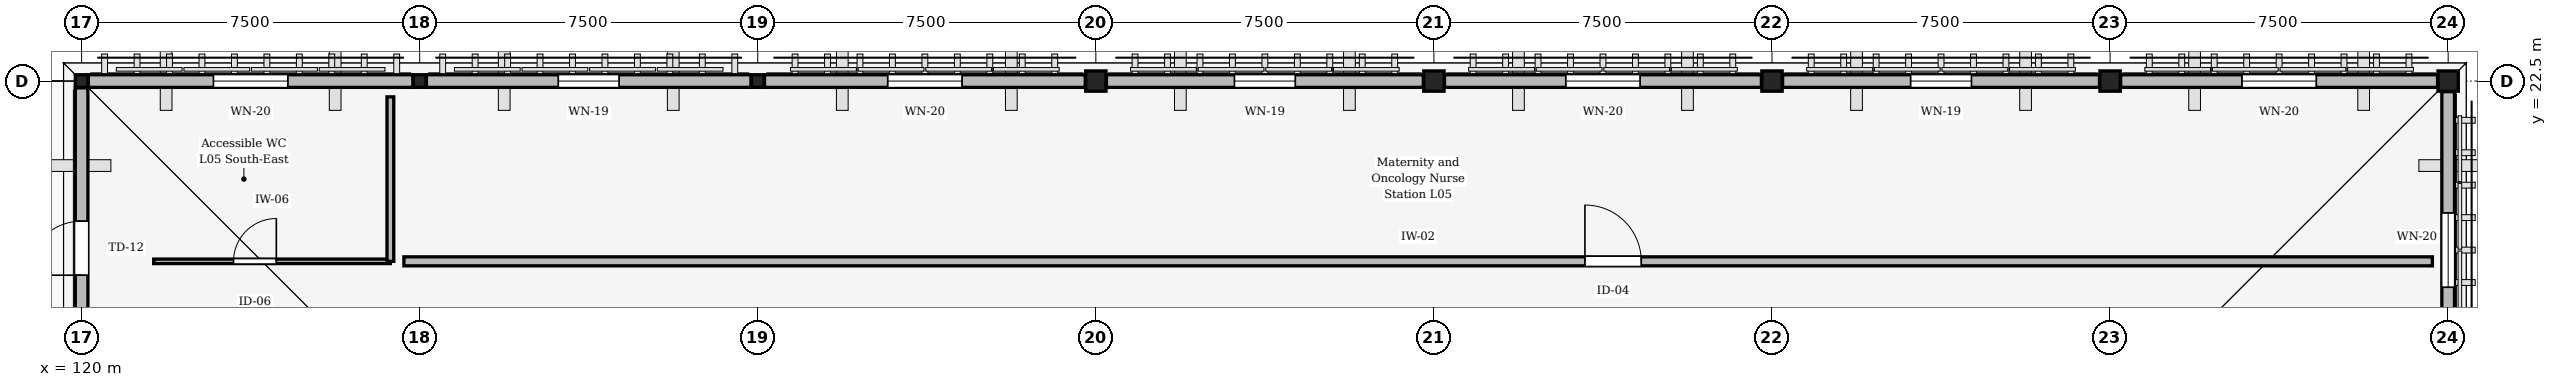
"""IFC4 building model, lengths in metres.
Left out: names, types, materials, properties, quantities, classifications, styles, units other than length and angle.
Written with IfcOpenShell. Run it as: python <this file> out.ifc"""

import sys

from ifc_helpers import new_model, si_unit, direction, frame, frame_2d, origin, origin_2d, place, context, subcontext, project, spatial, rectangle, extrude, element, fill, save


model = new_model("IFC4")
c1 = context("Model", 3, precision=1e-05, world=origin(), true_north=direction((0.0, 1.0)))
c2 = subcontext(c1, "Body", "Model", "MODEL_VIEW")
j1 = project(units=[si_unit("LENGTHUNIT", "METRE"), si_unit("PLANEANGLEUNIT", "RADIAN")], contexts=[c1])
p1 = place(None, origin())
s1 = spatial("IfcSite", under=j1, at=p1, CompositionType="ELEMENT")
p2 = place(p1, origin())
s2 = spatial("IfcBuilding", under=s1, at=p2, CompositionType="ELEMENT")
p3 = place(p2, frame((0.0, 0.0, 21.9)))
s3 = spatial("IfcBuildingStorey", under=s2, at=p3, CompositionType="ELEMENT", Elevation=21.9)
for number, where, z_axis, x_axis in (
    (1, (120.0, 22.5, 0.0), (0.0, 0.0, 1.0), (1.0, 0.0, 0.0)),
    (2, (127.5, 22.5, 0.0), (0.0, 0.0, 1.0), (1.0, 0.0, 0.0)),
    (3, (135.0, 22.5, 0.0), (0.0, 0.0, 1.0), (1.0, 0.0, 0.0)),
):
    element("IfcColumn", number, at=place(p3, frame(where, z_axis=z_axis, x_axis=x_axis)), inside=s3, PredefinedType="COLUMN", context=c2, shape_type="SweptSolid", body=[
        extrude(rectangle(XDim=0.28, YDim=0.28, at=origin_2d()), origin(), (0.0, 0.0, 1.0), 4.05),
    ])
for number, where, z_axis, x_axis in (
    (4, (142.5, 22.5, 0.0), (0.0, 0.0, 1.0), (1.0, 0.0, 0.0)),
    (5, (150.0, 22.5, 0.0), (0.0, 0.0, 1.0), (1.0, 0.0, 0.0)),
    (6, (157.5, 22.5, 0.0), (0.0, 0.0, 1.0), (1.0, 0.0, 0.0)),
    (7, (165.0, 22.5, 0.0), (0.0, 0.0, 1.0), (1.0, 0.0, 0.0)),
    (8, (172.5, 22.5, 0.0), (0.0, 0.0, 1.0), (1.0, 0.0, 0.0)),
):
    element("IfcColumn", number, at=place(p3, frame(where, z_axis=z_axis, x_axis=x_axis)), inside=s3, PredefinedType="COLUMN", context=c2, shape_type="SweptSolid", body=[
        extrude(rectangle(XDim=0.45, YDim=0.45, at=origin_2d()), origin(), (0.0, 0.0, 1.0), 4.05),
    ])
p4 = place(p3, frame((120.15, 22.5, 0.0), z_axis=(0.0, 0.0, 1.0), x_axis=(1.0, 0.0, 0.0)))
e9 = element("IfcWall", 9, at=p4, inside=s3, PredefinedType="STANDARD", context=c2, shape_type="SweptSolid", body=[
    extrude(rectangle(XDim=7.2, YDim=0.28, at=frame_2d((3.6, 0.0))), origin(), (0.0, 0.0, 1.0), 3.77),
])
p5 = place(p4, frame((2.775, 0.0, 0.85)))
e10 = element("IfcOpeningElement", 10, at=p5, cuts=e9, PredefinedType="OPENING", context=c2, shape_type="SweptSolid", body=[
    extrude(rectangle(XDim=1.65, YDim=2.25, at=frame_2d((0.825, 1.125))), frame((0.0, 0.15, 0.0), z_axis=(0.0, -1.0, 0.0), x_axis=(1.0, 0.0, 0.0)), (0.0, 0.0, 1.0), 0.3),
])
p6 = place(p3, frame((120.0, 15.235, 0.0), z_axis=(0.0, 0.0, 1.0), x_axis=(0.0, 1.0, 0.0)))
e11 = element("IfcWall", 11, at=p6, inside=s3, PredefinedType="STANDARD", context=c2, shape_type="SweptSolid", body=[
    extrude(rectangle(XDim=7.115, YDim=0.28, at=frame_2d((3.558, 0.0))), origin(), (0.0, 0.0, 1.0), 3.77),
])
p7 = place(p6, frame((2.958, 0.0, 0.0)))
e12 = element("IfcOpeningElement", 12, at=p7, cuts=e11, PredefinedType="OPENING", context=c2, shape_type="SweptSolid", body=[
    extrude(rectangle(XDim=1.2, YDim=2.3, at=frame_2d((0.6, 1.15))), frame((0.0, 0.15, 0.0), z_axis=(0.0, -1.0, 0.0), x_axis=(1.0, 0.0, 0.0)), (0.0, 0.0, 1.0), 0.3),
])
p8 = place(p3, frame((127.65, 22.5, 0.0), z_axis=(0.0, 0.0, 1.0), x_axis=(1.0, 0.0, 0.0)))
e13 = element("IfcWall", 13, at=p8, inside=s3, PredefinedType="STANDARD", context=c2, shape_type="SweptSolid", body=[
    extrude(rectangle(XDim=7.2, YDim=0.28, at=frame_2d((3.6, 0.0))), origin(), (0.0, 0.0, 1.0), 3.77),
])
p9 = place(p8, frame((2.925, 0.0, 0.85)))
e14 = element("IfcOpeningElement", 14, at=p9, cuts=e13, PredefinedType="OPENING", context=c2, shape_type="SweptSolid", body=[
    extrude(rectangle(XDim=1.35, YDim=2.25, at=frame_2d((0.675, 1.125))), frame((0.0, 0.15, 0.0), z_axis=(0.0, -1.0, 0.0), x_axis=(1.0, 0.0, 0.0)), (0.0, 0.0, 1.0), 0.3),
])
p10 = place(p3, frame((135.15, 22.5, 0.0), z_axis=(0.0, 0.0, 1.0), x_axis=(1.0, 0.0, 0.0)))
e15 = element("IfcWall", 15, at=p10, inside=s3, PredefinedType="STANDARD", context=c2, shape_type="SweptSolid", body=[
    extrude(rectangle(XDim=7.115, YDim=0.28, at=frame_2d((3.558, 0.0))), origin(), (0.0, 0.0, 1.0), 3.77),
])
p11 = place(p10, frame((2.732, 0.0, 0.85)))
e16 = element("IfcOpeningElement", 16, at=p11, cuts=e15, PredefinedType="OPENING", context=c2, shape_type="SweptSolid", body=[
    extrude(rectangle(XDim=1.65, YDim=2.25, at=frame_2d((0.825, 1.125))), frame((0.0, 0.15, 0.0), z_axis=(0.0, -1.0, 0.0), x_axis=(1.0, 0.0, 0.0)), (0.0, 0.0, 1.0), 0.3),
])
p12 = place(p3, frame((142.735, 22.5, 0.0), z_axis=(0.0, 0.0, 1.0), x_axis=(1.0, 0.0, 0.0)))
e17 = element("IfcWall", 17, at=p12, inside=s3, PredefinedType="STANDARD", context=c2, shape_type="SweptSolid", body=[
    extrude(rectangle(XDim=7.03, YDim=0.28, at=frame_2d((3.515, 0.0))), origin(), (0.0, 0.0, 1.0), 3.77),
])
p13 = place(p12, frame((2.84, 0.0, 0.85)))
e18 = element("IfcOpeningElement", 18, at=p13, cuts=e17, PredefinedType="OPENING", context=c2, shape_type="SweptSolid", body=[
    extrude(rectangle(XDim=1.35, YDim=2.25, at=frame_2d((0.675, 1.125))), frame((0.0, 0.15, 0.0), z_axis=(0.0, -1.0, 0.0), x_axis=(1.0, 0.0, 0.0)), (0.0, 0.0, 1.0), 0.3),
])
p14 = place(p3, frame((150.235, 22.5, 0.0), z_axis=(0.0, 0.0, 1.0), x_axis=(1.0, 0.0, 0.0)))
e19 = element("IfcWall", 19, at=p14, inside=s3, PredefinedType="STANDARD", context=c2, shape_type="SweptSolid", body=[
    extrude(rectangle(XDim=7.03, YDim=0.28, at=frame_2d((3.515, 0.0))), origin(), (0.0, 0.0, 1.0), 3.77),
])
p15 = place(p14, frame((2.69, 0.0, 0.85)))
e20 = element("IfcOpeningElement", 20, at=p15, cuts=e19, PredefinedType="OPENING", context=c2, shape_type="SweptSolid", body=[
    extrude(rectangle(XDim=1.65, YDim=2.25, at=frame_2d((0.825, 1.125))), frame((0.0, 0.15, 0.0), z_axis=(0.0, -1.0, 0.0), x_axis=(1.0, 0.0, 0.0)), (0.0, 0.0, 1.0), 0.3),
])
p16 = place(p3, frame((157.735, 22.5, 0.0), z_axis=(0.0, 0.0, 1.0), x_axis=(1.0, 0.0, 0.0)))
e21 = element("IfcWall", 21, at=p16, inside=s3, PredefinedType="STANDARD", context=c2, shape_type="SweptSolid", body=[
    extrude(rectangle(XDim=7.03, YDim=0.28, at=frame_2d((3.515, 0.0))), origin(), (0.0, 0.0, 1.0), 3.77),
])
p17 = place(p16, frame((2.84, 0.0, 0.85)))
e22 = element("IfcOpeningElement", 22, at=p17, cuts=e21, PredefinedType="OPENING", context=c2, shape_type="SweptSolid", body=[
    extrude(rectangle(XDim=1.35, YDim=2.25, at=frame_2d((0.675, 1.125))), frame((0.0, 0.15, 0.0), z_axis=(0.0, -1.0, 0.0), x_axis=(1.0, 0.0, 0.0)), (0.0, 0.0, 1.0), 0.3),
])
p18 = place(p3, frame((165.235, 22.5, 0.0), z_axis=(0.0, 0.0, 1.0), x_axis=(1.0, 0.0, 0.0)))
e23 = element("IfcWall", 23, at=p18, inside=s3, PredefinedType="STANDARD", context=c2, shape_type="SweptSolid", body=[
    extrude(rectangle(XDim=7.03, YDim=0.28, at=frame_2d((3.515, 0.0))), origin(), (0.0, 0.0, 1.0), 3.77),
])
p19 = place(p18, frame((2.69, 0.0, 0.85)))
e24 = element("IfcOpeningElement", 24, at=p19, cuts=e23, PredefinedType="OPENING", context=c2, shape_type="SweptSolid", body=[
    extrude(rectangle(XDim=1.65, YDim=2.25, at=frame_2d((0.825, 1.125))), frame((0.0, 0.15, 0.0), z_axis=(0.0, -1.0, 0.0), x_axis=(1.0, 0.0, 0.0)), (0.0, 0.0, 1.0), 0.3),
])
p20 = place(p3, frame((172.5, 22.265, 0.0), z_axis=(0.0, 0.0, 1.0), x_axis=(0.0, -1.0, 0.0)))
e25 = element("IfcWall", 25, at=p20, inside=s3, PredefinedType="STANDARD", context=c2, shape_type="SweptSolid", body=[
    extrude(rectangle(XDim=7.03, YDim=0.28, at=frame_2d((3.515, 0.0))), origin(), (0.0, 0.0, 1.0), 3.77),
])
p21 = place(p20, frame((2.69, 0.0, 0.85)))
e26 = element("IfcOpeningElement", 26, at=p21, cuts=e25, PredefinedType="OPENING", context=c2, shape_type="SweptSolid", body=[
    extrude(rectangle(XDim=1.65, YDim=2.25, at=frame_2d((0.825, 1.125))), frame((0.0, 0.15, 0.0), z_axis=(0.0, -1.0, 0.0), x_axis=(1.0, 0.0, 0.0)), (0.0, 0.0, 1.0), 0.3),
])
p22 = place(p3, frame((121.6, 18.5, 0.0), z_axis=(0.0, 0.0, 1.0), x_axis=(1.0, 0.0, 0.0)))
e27 = element("IfcWall", 27, at=p22, inside=s3, PredefinedType="PARTITIONING", context=c2, shape_type="SweptSolid", body=[
    extrude(rectangle(XDim=5.25, YDim=0.1, at=frame_2d((2.625, 0.0))), origin(), (0.0, 0.0, 1.0), 3.755),
])
p23 = place(p22, frame((1.77, 0.0, 0.0)))
e28 = element("IfcOpeningElement", 28, at=p23, cuts=e27, PredefinedType="OPENING", context=c2, shape_type="SweptSolid", body=[
    extrude(rectangle(XDim=0.95, YDim=2.15, at=frame_2d((0.475, 1.075))), frame((0.0, 0.06, 0.0), z_axis=(0.0, -1.0, 0.0), x_axis=(1.0, 0.0, 0.0)), (0.0, 0.0, 1.0), 0.12),
])
p24 = place(p3, frame((127.15, 18.5, 0.0), z_axis=(0.0, 0.0, 1.0), x_axis=(1.0, 0.0, 0.0)))
e29 = element("IfcWall", 29, at=p24, inside=s3, PredefinedType="STANDARD", context=c2, shape_type="SweptSolid", body=[
    extrude(rectangle(XDim=45.0, YDim=0.2, at=frame_2d((22.5, 0.0))), origin(), (0.0, 0.0, 1.0), 3.755),
])
p25 = place(p24, frame((26.2, 0.0, 0.0)))
e30 = element("IfcOpeningElement", 30, at=p25, cuts=e29, PredefinedType="OPENING", context=c2, shape_type="SweptSolid", body=[
    extrude(rectangle(XDim=1.25, YDim=2.2, at=frame_2d((0.625, 1.1))), frame((0.0, 0.11, 0.0), z_axis=(0.0, -1.0, 0.0), x_axis=(1.0, 0.0, 0.0)), (0.0, 0.0, 1.0), 0.22),
])
p26 = place(p3, frame((126.85, 18.5, 0.0), z_axis=(0.0, 0.0, 1.0), x_axis=(0.0, 1.0, 0.0)))
e31 = element("IfcWall", 31, at=p26, inside=s3, PredefinedType="PARTITIONING", context=c2, shape_type="SweptSolid", body=[
    extrude(rectangle(XDim=3.65, YDim=0.15, at=frame_2d((1.825, 0.0))), origin(), (0.0, 0.0, 1.0), 3.755),
])
p27 = place(p5, origin())
e32 = element("IfcWindow", 32, at=p27, inside=s3, PartitioningType="SINGLE_PANEL", PredefinedType="WINDOW", context=c2, shape_type="SweptSolid", body=[
    extrude(rectangle(XDim=1.65, YDim=2.25, at=frame_2d((0.825, 1.125))), frame((0.0, 0.03, 0.0), z_axis=(0.0, -1.0, 0.0), x_axis=(1.0, 0.0, 0.0)), (0.0, 0.0, 1.0), 0.06),
])
fill(e10, e32)
p28 = place(p7, origin())
e33 = element("IfcDoor", 33, at=p28, inside=s3, OperationType="SINGLE_SWING_LEFT", PredefinedType="DOOR", context=c2, shape_type="SweptSolid", body=[
    extrude(rectangle(XDim=1.2, YDim=2.3, at=frame_2d((0.6, 1.15))), frame((0.0, 0.025, 0.0), z_axis=(0.0, -1.0, 0.0), x_axis=(1.0, 0.0, 0.0)), (0.0, 0.0, 1.0), 0.05),
])
fill(e12, e33)
p29 = place(p9, origin())
e34 = element("IfcWindow", 34, at=p29, inside=s3, PartitioningType="SINGLE_PANEL", PredefinedType="WINDOW", context=c2, shape_type="SweptSolid", body=[
    extrude(rectangle(XDim=1.35, YDim=2.25, at=frame_2d((0.675, 1.125))), frame((0.0, 0.03, 0.0), z_axis=(0.0, -1.0, 0.0), x_axis=(1.0, 0.0, 0.0)), (0.0, 0.0, 1.0), 0.06),
])
fill(e14, e34)
p30 = place(p11, origin())
e35 = element("IfcWindow", 35, at=p30, inside=s3, PartitioningType="SINGLE_PANEL", PredefinedType="WINDOW", context=c2, shape_type="SweptSolid", body=[
    extrude(rectangle(XDim=1.65, YDim=2.25, at=frame_2d((0.825, 1.125))), frame((0.0, 0.03, 0.0), z_axis=(0.0, -1.0, 0.0), x_axis=(1.0, 0.0, 0.0)), (0.0, 0.0, 1.0), 0.06),
])
fill(e16, e35)
p31 = place(p13, origin())
e36 = element("IfcWindow", 36, at=p31, inside=s3, PartitioningType="SINGLE_PANEL", PredefinedType="WINDOW", context=c2, shape_type="SweptSolid", body=[
    extrude(rectangle(XDim=1.35, YDim=2.25, at=frame_2d((0.675, 1.125))), frame((0.0, 0.03, 0.0), z_axis=(0.0, -1.0, 0.0), x_axis=(1.0, 0.0, 0.0)), (0.0, 0.0, 1.0), 0.06),
])
fill(e18, e36)
p32 = place(p15, origin())
e37 = element("IfcWindow", 37, at=p32, inside=s3, PartitioningType="SINGLE_PANEL", PredefinedType="WINDOW", context=c2, shape_type="SweptSolid", body=[
    extrude(rectangle(XDim=1.65, YDim=2.25, at=frame_2d((0.825, 1.125))), frame((0.0, 0.03, 0.0), z_axis=(0.0, -1.0, 0.0), x_axis=(1.0, 0.0, 0.0)), (0.0, 0.0, 1.0), 0.06),
])
fill(e20, e37)
p33 = place(p17, origin())
e38 = element("IfcWindow", 38, at=p33, inside=s3, PartitioningType="SINGLE_PANEL", PredefinedType="WINDOW", context=c2, shape_type="SweptSolid", body=[
    extrude(rectangle(XDim=1.35, YDim=2.25, at=frame_2d((0.675, 1.125))), frame((0.0, 0.03, 0.0), z_axis=(0.0, -1.0, 0.0), x_axis=(1.0, 0.0, 0.0)), (0.0, 0.0, 1.0), 0.06),
])
fill(e22, e38)
p34 = place(p19, origin())
e39 = element("IfcWindow", 39, at=p34, inside=s3, PartitioningType="SINGLE_PANEL", PredefinedType="WINDOW", context=c2, shape_type="SweptSolid", body=[
    extrude(rectangle(XDim=1.65, YDim=2.25, at=frame_2d((0.825, 1.125))), frame((0.0, 0.03, 0.0), z_axis=(0.0, -1.0, 0.0), x_axis=(1.0, 0.0, 0.0)), (0.0, 0.0, 1.0), 0.06),
])
fill(e24, e39)
p35 = place(p21, origin())
e40 = element("IfcWindow", 40, at=p35, inside=s3, PartitioningType="SINGLE_PANEL", PredefinedType="WINDOW", context=c2, shape_type="SweptSolid", body=[
    extrude(rectangle(XDim=1.65, YDim=2.25, at=frame_2d((0.825, 1.125))), frame((0.0, 0.03, 0.0), z_axis=(0.0, -1.0, 0.0), x_axis=(1.0, 0.0, 0.0)), (0.0, 0.0, 1.0), 0.06),
])
fill(e26, e40)
p36 = place(p23, origin())
e41 = element("IfcDoor", 41, at=p36, inside=s3, OperationType="SINGLE_SWING_RIGHT", PredefinedType="DOOR", context=c2, shape_type="SweptSolid", body=[
    extrude(rectangle(XDim=0.95, YDim=2.15, at=frame_2d((0.475, 1.075))), frame((0.0, 0.025, 0.0), z_axis=(0.0, -1.0, 0.0), x_axis=(1.0, 0.0, 0.0)), (0.0, 0.0, 1.0), 0.05),
])
fill(e28, e41)
p37 = place(p25, origin())
e42 = element("IfcDoor", 42, at=p37, inside=s3, OperationType="SINGLE_SWING_LEFT", PredefinedType="DOOR", context=c2, shape_type="SweptSolid", body=[
    extrude(rectangle(XDim=1.25, YDim=2.2, at=frame_2d((0.625, 1.1))), frame((0.0, 0.025, 0.0), z_axis=(0.0, -1.0, 0.0), x_axis=(1.0, 0.0, 0.0)), (0.0, 0.0, 1.0), 0.05),
])
fill(e30, e42)
save(model, sys.argv[1])
